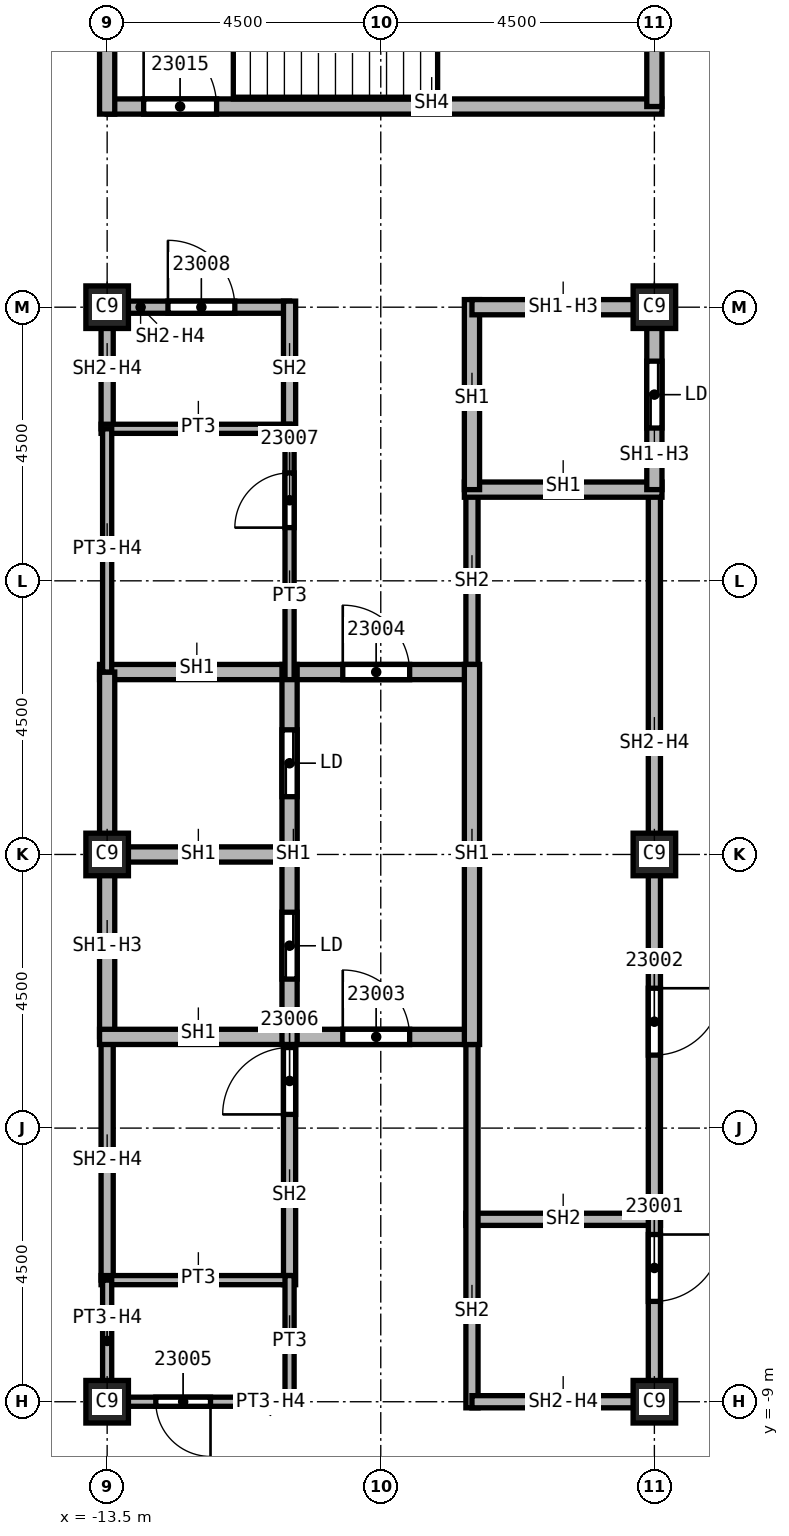
"""IFC4 building model, lengths in metres.
Left out: names, types, materials, properties, quantities, classifications, styles, units other than length and angle.
Written with IfcOpenShell. Run it as: python <this file> out.ifc"""

import sys

from ifc_helpers import new_model, si_unit, direction, frame, frame_2d, origin, origin_2d, place, context, subcontext, project, spatial, rectangle, extrude, element, fill, save


model = new_model("IFC4")
c1 = context("Model", 3, precision=1e-05, world=origin(), true_north=direction((0.0, 1.0)))
c2 = subcontext(c1, "Body", "Model", "MODEL_VIEW")
j1 = project(units=[si_unit("LENGTHUNIT", "METRE"), si_unit("PLANEANGLEUNIT", "RADIAN")], contexts=[c1])
p1 = place(None, origin())
s1 = spatial("IfcSite", under=j1, at=p1, CompositionType="ELEMENT")
p2 = place(p1, origin())
s2 = spatial("IfcBuilding", under=s1, at=p2, CompositionType="ELEMENT")
p3 = place(p2, frame((0.0, 0.0, 326.0)))
s3 = spatial("IfcBuildingStorey", under=s2, at=p3, CompositionType="ELEMENT", Elevation=326.0)
for number, where, z_axis, x_axis in (
    (1, (-4.5, 0.0, 0.0), (0.0, 0.0, 1.0), (1.0, 0.0, 0.0)),
    (2, (-4.5, 9.0, 0.0), (0.0, 0.0, 1.0), (1.0, 0.0, 0.0)),
    (3, (-4.5, -9.0, 0.0), (0.0, 0.0, 1.0), (1.0, 0.0, 0.0)),
    (4, (-13.5, 0.0, 0.0), (0.0, 0.0, 1.0), (1.0, 0.0, 0.0)),
    (5, (-13.5, 9.0, 0.0), (0.0, 0.0, 1.0), (1.0, 0.0, 0.0)),
    (6, (-13.5, -9.0, 0.0), (0.0, 0.0, 1.0), (1.0, 0.0, 0.0)),
):
    element("IfcColumn", number, at=place(p3, frame(where, z_axis=z_axis, x_axis=x_axis)), inside=s3, PredefinedType="COLUMN", context=c2, shape_type="SweptSolid", body=[
        extrude(rectangle(XDim=0.7, YDim=0.7, at=origin_2d()), origin(), (0.0, 0.0, 1.0), 3.74),
    ])
p4 = place(p3, frame((-13.5, -7.0, 0.0), z_axis=(0.0, 0.0, 1.0), x_axis=(0.0, 1.0, 0.0)))
e7 = element("IfcWall", 7, at=p4, inside=s3, PredefinedType="SOLIDWALL", context=c2, shape_type="SweptSolid", body=[
    extrude(rectangle(XDim=4.0, YDim=0.2, at=frame_2d((2.0, 0.0))), origin(), (0.0, 0.0, 1.0), 3.062),
])
p5 = place(p3, frame((-13.5, 7.0, 0.0), z_axis=(0.0, 0.0, 1.0), x_axis=(0.0, 1.0, 0.0)))
e8 = element("IfcWall", 8, at=p5, inside=s3, PredefinedType="SOLIDWALL", context=c2, shape_type="SweptSolid", body=[
    extrude(rectangle(XDim=2.1, YDim=0.2, at=frame_2d((1.05, 0.0))), origin(), (0.0, 0.0, 1.0), 3.062),
])
p6 = place(p3, frame((-13.5, 9.0, 0.0), z_axis=(0.0, 0.0, 1.0), x_axis=(1.0, 0.0, 0.0)))
e9 = element("IfcWall", 9, at=p6, inside=s3, PredefinedType="SOLIDWALL", context=c2, shape_type="SweptSolid", body=[
    extrude(rectangle(XDim=3.0, YDim=0.2, at=frame_2d((1.5, 0.0))), origin(), (0.0, 0.0, 1.0), 3.062),
])
p7 = place(p6, frame((1.0, 0.0, 0.0)))
e10 = element("IfcOpeningElement", 10, at=p7, cuts=e9, PredefinedType="OPENING", context=c2, shape_type="SweptSolid", body=[
    extrude(rectangle(XDim=1.1, YDim=2.1, at=frame_2d((0.55, 1.05))), frame((0.0, 0.1, 0.0), z_axis=(0.0, -1.0, 0.0), x_axis=(1.0, 0.0, 0.0)), (0.0, 0.0, 1.0), 0.2),
])
p8 = place(p3, frame((-10.5, -7.075, 0.0), z_axis=(0.0, 0.0, 1.0), x_axis=(0.0, 1.0, 0.0)))
e11 = element("IfcWall", 11, at=p8, inside=s3, PredefinedType="SOLIDWALL", context=c2, shape_type="SweptSolid", body=[
    extrude(rectangle(XDim=4.2, YDim=0.2, at=frame_2d((2.1, 0.0))), origin(), (0.0, 0.0, 1.0), 3.74),
])
p9 = place(p8, frame((2.8, 0.0, 0.0)))
e12 = element("IfcOpeningElement", 12, at=p9, cuts=e11, PredefinedType="OPENING", context=c2, shape_type="SweptSolid", body=[
    extrude(rectangle(XDim=1.1, YDim=2.1, at=frame_2d((0.55, 1.05))), frame((0.0, 0.1, 0.0), z_axis=(0.0, -1.0, 0.0), x_axis=(1.0, 0.0, 0.0)), (0.0, 0.0, 1.0), 0.2),
])
p10 = place(p3, frame((-10.5, 6.925, 0.0), z_axis=(0.0, 0.0, 1.0), x_axis=(0.0, 1.0, 0.0)))
e13 = element("IfcWall", 13, at=p10, inside=s3, PredefinedType="SOLIDWALL", context=c2, shape_type="SweptSolid", body=[
    extrude(rectangle(XDim=2.175, YDim=0.2, at=frame_2d((1.087, 0.0))), origin(), (0.0, 0.0, 1.0), 3.74),
])
p11 = place(p3, frame((-7.6, -6.0, 0.0), z_axis=(0.0, 0.0, 1.0), x_axis=(1.0, 0.0, 0.0)))
e14 = element("IfcWall", 14, at=p11, inside=s3, PredefinedType="SOLIDWALL", context=c2, shape_type="SweptSolid", body=[
    extrude(rectangle(XDim=3.2, YDim=0.2, at=frame_2d((1.6, 0.0))), origin(), (0.0, 0.0, 1.0), 3.74),
])
p12 = place(p3, frame((-7.5, -9.1, 0.0), z_axis=(0.0, 0.0, 1.0), x_axis=(0.0, 1.0, 0.0)))
e15 = element("IfcWall", 15, at=p12, inside=s3, PredefinedType="SOLIDWALL", context=c2, shape_type="SweptSolid", body=[
    extrude(rectangle(XDim=6.225, YDim=0.2, at=frame_2d((3.113, 0.0))), origin(), (0.0, 0.0, 1.0), 3.74),
])
p13 = place(p3, frame((-7.5, 2.875, 0.0), z_axis=(0.0, 0.0, 1.0), x_axis=(0.0, 1.0, 0.0)))
e16 = element("IfcWall", 16, at=p13, inside=s3, PredefinedType="SOLIDWALL", context=c2, shape_type="SweptSolid", body=[
    extrude(rectangle(XDim=3.125, YDim=0.2, at=frame_2d((1.562, 0.0))), origin(), (0.0, 0.0, 1.0), 3.74),
])
p14 = place(p3, frame((-4.5, -9.0, 0.0), z_axis=(0.0, 0.0, 1.0), x_axis=(-1.0, 0.0, 0.0)))
e17 = element("IfcWall", 17, at=p14, inside=s3, PredefinedType="SOLIDWALL", context=c2, shape_type="SweptSolid", body=[
    extrude(rectangle(XDim=3.0, YDim=0.2, at=frame_2d((1.5, 0.0))), origin(), (0.0, 0.0, 1.0), 3.062),
])
p15 = place(p3, frame((-4.5, 6.0, 0.0), z_axis=(0.0, 0.0, 1.0), x_axis=(0.0, -1.0, 0.0)))
e18 = element("IfcWall", 18, at=p15, inside=s3, PredefinedType="SOLIDWALL", context=c2, shape_type="SweptSolid", body=[
    extrude(rectangle(XDim=15.1, YDim=0.2, at=frame_2d((7.55, 0.0))), origin(), (0.0, 0.0, 1.0), 3.062),
])
p16 = place(p15, frame((12.25, 0.0, 0.0)))
e19 = element("IfcOpeningElement", 19, at=p16, cuts=e18, PredefinedType="OPENING", context=c2, shape_type="SweptSolid", body=[
    extrude(rectangle(XDim=1.1, YDim=2.1, at=frame_2d((0.55, 1.05))), frame((0.0, 0.1, 0.0), z_axis=(0.0, -1.0, 0.0), x_axis=(1.0, 0.0, 0.0)), (0.0, 0.0, 1.0), 0.2),
])
p17 = place(p15, frame((8.2, 0.0, 0.0)))
e20 = element("IfcOpeningElement", 20, at=p17, cuts=e18, PredefinedType="OPENING", context=c2, shape_type="SweptSolid", body=[
    extrude(rectangle(XDim=1.1, YDim=2.1, at=frame_2d((0.55, 1.05))), frame((0.0, 0.1, 0.0), z_axis=(0.0, -1.0, 0.0), x_axis=(1.0, 0.0, 0.0)), (0.0, 0.0, 1.0), 0.2),
])
p18 = place(p3, frame((-13.625, 0.0, 0.0), z_axis=(0.0, 0.0, 1.0), x_axis=(1.0, 0.0, 0.0)))
e21 = element("IfcWall", 21, at=p18, inside=s3, PredefinedType="SOLIDWALL", context=c2, shape_type="SweptSolid", body=[
    extrude(rectangle(XDim=3.125, YDim=0.25, at=frame_2d((1.562, 0.0))), origin(), (0.0, 0.0, 1.0), 3.74),
])
p19 = place(p3, frame((-13.625, 3.0, 0.0), z_axis=(0.0, 0.0, 1.0), x_axis=(1.0, 0.0, 0.0)))
e22 = element("IfcWall", 22, at=p19, inside=s3, PredefinedType="SOLIDWALL", context=c2, shape_type="SweptSolid", body=[
    extrude(rectangle(XDim=6.125, YDim=0.25, at=frame_2d((3.062, 0.0))), origin(), (0.0, 0.0, 1.0), 3.74),
])
p20 = place(p19, frame((4.0, 0.0, 0.0)))
e23 = element("IfcOpeningElement", 23, at=p20, cuts=e22, PredefinedType="OPENING", context=c2, shape_type="SweptSolid", body=[
    extrude(rectangle(XDim=1.1, YDim=2.1, at=frame_2d((0.55, 1.05))), frame((0.0, 0.125, 0.0), z_axis=(0.0, -1.0, 0.0), x_axis=(1.0, 0.0, 0.0)), (0.0, 0.0, 1.0), 0.25),
])
p21 = place(p3, frame((-13.5, -3.0, 0.0), z_axis=(0.0, 0.0, 1.0), x_axis=(0.0, 1.0, 0.0)))
e24 = element("IfcWall", 24, at=p21, inside=s3, PredefinedType="SOLIDWALL", context=c2, shape_type="SweptSolid", body=[
    extrude(rectangle(XDim=6.0, YDim=0.25, at=frame_2d((3.0, 0.0))), origin(), (0.0, 0.0, 1.0), 3.062),
])
p22 = place(p3, frame((-13.625, -3.0, 0.0), z_axis=(0.0, 0.0, 1.0), x_axis=(1.0, 0.0, 0.0)))
e25 = element("IfcWall", 25, at=p22, inside=s3, PredefinedType="SOLIDWALL", context=c2, shape_type="SweptSolid", body=[
    extrude(rectangle(XDim=6.125, YDim=0.25, at=frame_2d((3.062, 0.0))), origin(), (0.0, 0.0, 1.0), 3.74),
])
p23 = place(p22, frame((4.0, 0.0, 0.0)))
e26 = element("IfcOpeningElement", 26, at=p23, cuts=e25, PredefinedType="OPENING", context=c2, shape_type="SweptSolid", body=[
    extrude(rectangle(XDim=1.1, YDim=2.1, at=frame_2d((0.55, 1.05))), frame((0.0, 0.125, 0.0), z_axis=(0.0, -1.0, 0.0), x_axis=(1.0, 0.0, 0.0)), (0.0, 0.0, 1.0), 0.25),
])
p24 = place(p3, frame((-10.5, -3.125, 0.0), z_axis=(0.0, 0.0, 1.0), x_axis=(0.0, 1.0, 0.0)))
e27 = element("IfcWall", 27, at=p24, inside=s3, PredefinedType="SOLIDWALL", context=c2, shape_type="SweptSolid", body=[
    extrude(rectangle(XDim=6.25, YDim=0.25, at=frame_2d((3.125, 0.0))), origin(), (0.0, 0.0, 1.0), 3.74),
])
p25 = place(p24, frame((1.075, 0.0, 0.0)))
e28 = element("IfcOpeningElement", 28, at=p25, cuts=e27, PredefinedType="OPENING", context=c2, shape_type="SweptSolid", body=[
    extrude(rectangle(XDim=1.1, YDim=2.1, at=frame_2d((0.55, 1.05))), frame((0.0, 0.125, 0.0), z_axis=(0.0, -1.0, 0.0), x_axis=(1.0, 0.0, 0.0)), (0.0, 0.0, 1.0), 0.25),
])
p26 = place(p24, frame((4.075, 0.0, 0.0)))
e29 = element("IfcOpeningElement", 29, at=p26, cuts=e27, PredefinedType="OPENING", context=c2, shape_type="SweptSolid", body=[
    extrude(rectangle(XDim=1.1, YDim=2.1, at=frame_2d((0.55, 1.05))), frame((0.0, 0.125, 0.0), z_axis=(0.0, -1.0, 0.0), x_axis=(1.0, 0.0, 0.0)), (0.0, 0.0, 1.0), 0.25),
])
p27 = place(p3, frame((-7.625, 6.0, 0.0), z_axis=(0.0, 0.0, 1.0), x_axis=(1.0, 0.0, 0.0)))
e30 = element("IfcWall", 30, at=p27, inside=s3, PredefinedType="SOLIDWALL", context=c2, shape_type="SweptSolid", body=[
    extrude(rectangle(XDim=3.25, YDim=0.25, at=frame_2d((1.625, 0.0))), origin(), (0.0, 0.0, 1.0), 3.74),
])
p28 = place(p3, frame((-7.5, -3.125, 0.0), z_axis=(0.0, 0.0, 1.0), x_axis=(0.0, 1.0, 0.0)))
e31 = element("IfcWall", 31, at=p28, inside=s3, PredefinedType="SOLIDWALL", context=c2, shape_type="SweptSolid", body=[
    extrude(rectangle(XDim=6.25, YDim=0.25, at=frame_2d((3.125, 0.0))), origin(), (0.0, 0.0, 1.0), 3.74),
])
p29 = place(p3, frame((-7.5, 6.0, 0.0), z_axis=(0.0, 0.0, 1.0), x_axis=(0.0, 1.0, 0.0)))
e32 = element("IfcWall", 32, at=p29, inside=s3, PredefinedType="SOLIDWALL", context=c2, shape_type="SweptSolid", body=[
    extrude(rectangle(XDim=3.125, YDim=0.25, at=frame_2d((1.562, 0.0))), origin(), (0.0, 0.0, 1.0), 3.74),
])
p30 = place(p3, frame((-7.5, 9.0, 0.0), z_axis=(0.0, 0.0, 1.0), x_axis=(1.0, 0.0, 0.0)))
e33 = element("IfcWall", 33, at=p30, inside=s3, PredefinedType="SOLIDWALL", context=c2, shape_type="SweptSolid", body=[
    extrude(rectangle(XDim=3.0, YDim=0.25, at=frame_2d((1.5, 0.0))), origin(), (0.0, 0.0, 1.0), 3.062),
])
p31 = place(p3, frame((-4.5, 9.125, 0.0), z_axis=(0.0, 0.0, 1.0), x_axis=(0.0, -1.0, 0.0)))
e34 = element("IfcWall", 34, at=p31, inside=s3, PredefinedType="SOLIDWALL", context=c2, shape_type="SweptSolid", body=[
    extrude(rectangle(XDim=3.125, YDim=0.25, at=frame_2d((1.562, 0.0))), origin(), (0.0, 0.0, 1.0), 3.062),
])
p32 = place(p31, frame((1.012, 0.0, 0.0)))
e35 = element("IfcOpeningElement", 35, at=p32, cuts=e34, PredefinedType="OPENING", context=c2, shape_type="SweptSolid", body=[
    extrude(rectangle(XDim=1.1, YDim=2.1, at=frame_2d((0.55, 1.05))), frame((0.0, 0.125, 0.0), z_axis=(0.0, -1.0, 0.0), x_axis=(1.0, 0.0, 0.0)), (0.0, 0.0, 1.0), 0.25),
])
p33 = place(p3, frame((-13.5, 12.3, 0.0), z_axis=(0.0, 0.0, 1.0), x_axis=(1.0, 0.0, 0.0)))
e36 = element("IfcWall", 36, at=p33, inside=s3, PredefinedType="SOLIDWALL", context=c2, shape_type="SweptSolid", body=[
    extrude(rectangle(XDim=9.125, YDim=0.25, at=frame_2d((4.562, 0.0))), origin(), (0.0, 0.0, 1.0), 3.74),
])
p34 = place(p33, frame((0.6, 0.0, 0.0)))
e37 = element("IfcOpeningElement", 37, at=p34, cuts=e36, PredefinedType="OPENING", context=c2, shape_type="SweptSolid", body=[
    extrude(rectangle(XDim=1.2, YDim=2.1, at=frame_2d((0.6, 1.05))), frame((0.0, 0.125, 0.0), z_axis=(0.0, -1.0, 0.0), x_axis=(1.0, 0.0, 0.0)), (0.0, 0.0, 1.0), 0.25),
])
p35 = place(p3, frame((-13.5, 12.175, 0.0), z_axis=(0.0, 0.0, 1.0), x_axis=(0.0, 1.0, 0.0)))
e38 = element("IfcWall", 38, at=p35, inside=s3, PredefinedType="SOLIDWALL", context=c2, shape_type="SweptSolid", body=[
    extrude(rectangle(XDim=4.75, YDim=0.25, at=frame_2d((2.375, 0.0))), origin(), (0.0, 0.0, 1.0), 3.74),
])
p36 = place(p3, frame((-4.5, 16.8, 0.0), z_axis=(0.0, 0.0, 1.0), x_axis=(0.0, -1.0, 0.0)))
e39 = element("IfcWall", 39, at=p36, inside=s3, PredefinedType="SOLIDWALL", context=c2, shape_type="SweptSolid", body=[
    extrude(rectangle(XDim=4.5, YDim=0.25, at=frame_2d((2.25, 0.0))), origin(), (0.0, 0.0, 1.0), 3.74),
])
for number, where, z_axis, x_axis in (
    (40, (-13.6, -7.0, 0.0), (0.0, 0.0, 1.0), (1.0, 0.0, 0.0)),
    (41, (-13.6, 7.0, 0.0), (0.0, 0.0, 1.0), (1.0, 0.0, 0.0)),
):
    element("IfcWall", number, at=place(p3, frame(where, z_axis=z_axis, x_axis=x_axis)), inside=s3, PredefinedType="PARTITIONING", context=c2, shape_type="SweptSolid", body=[
        extrude(rectangle(XDim=3.1, YDim=0.15, at=frame_2d((1.55, 0.0))), origin(), (0.0, 0.0, 1.0), 3.74),
    ])
p37 = place(p3, frame((-13.5, -9.075, 0.0), z_axis=(0.0, 0.0, 1.0), x_axis=(0.0, 1.0, 0.0)))
e42 = element("IfcWall", 42, at=p37, inside=s3, PredefinedType="PARTITIONING", context=c2, shape_type="SweptSolid", body=[
    extrude(rectangle(XDim=2.075, YDim=0.15, at=frame_2d((1.038, 0.0))), origin(), (0.0, 0.0, 1.0), 3.062),
])
p38 = place(p3, frame((-13.5, 3.0, 0.0), z_axis=(0.0, 0.0, 1.0), x_axis=(0.0, 1.0, 0.0)))
e43 = element("IfcWall", 43, at=p38, inside=s3, PredefinedType="PARTITIONING", context=c2, shape_type="SweptSolid", body=[
    extrude(rectangle(XDim=4.0, YDim=0.15, at=frame_2d((2.0, 0.0))), origin(), (0.0, 0.0, 1.0), 3.062),
])
p39 = place(p3, frame((-10.5, -9.075, 0.0), z_axis=(0.0, 0.0, 1.0), x_axis=(0.0, 1.0, 0.0)))
e44 = element("IfcWall", 44, at=p39, inside=s3, PredefinedType="PARTITIONING", context=c2, shape_type="SweptSolid", body=[
    extrude(rectangle(XDim=2.15, YDim=0.15, at=frame_2d((1.075, 0.0))), origin(), (0.0, 0.0, 1.0), 3.74),
])
p40 = place(p3, frame((-10.5, -9.0, 0.0), z_axis=(0.0, 0.0, 1.0), x_axis=(-1.0, 0.0, 0.0)))
e45 = element("IfcWall", 45, at=p40, inside=s3, PredefinedType="PARTITIONING", context=c2, shape_type="SweptSolid", body=[
    extrude(rectangle(XDim=3.0, YDim=0.15, at=frame_2d((1.5, 0.0))), origin(), (0.0, 0.0, 1.0), 3.062),
])
p41 = place(p40, frame((1.3, 0.0, 0.0)))
e46 = element("IfcOpeningElement", 46, at=p41, cuts=e45, PredefinedType="OPENING", context=c2, shape_type="SweptSolid", body=[
    extrude(rectangle(XDim=0.9, YDim=2.1, at=frame_2d((0.45, 1.05))), frame((0.0, 0.075, 0.0), z_axis=(0.0, -1.0, 0.0), x_axis=(1.0, 0.0, 0.0)), (0.0, 0.0, 1.0), 0.15),
])
p42 = place(p3, frame((-10.5, 2.875, 0.0), z_axis=(0.0, 0.0, 1.0), x_axis=(0.0, 1.0, 0.0)))
e47 = element("IfcWall", 47, at=p42, inside=s3, PredefinedType="PARTITIONING", context=c2, shape_type="SweptSolid", body=[
    extrude(rectangle(XDim=4.2, YDim=0.15, at=frame_2d((2.1, 0.0))), origin(), (0.0, 0.0, 1.0), 3.74),
])
p43 = place(p42, frame((2.5, 0.0, 0.0)))
e48 = element("IfcOpeningElement", 48, at=p43, cuts=e47, PredefinedType="OPENING", context=c2, shape_type="SweptSolid", body=[
    extrude(rectangle(XDim=0.9, YDim=2.1, at=frame_2d((0.45, 1.05))), frame((0.0, 0.075, 0.0), z_axis=(0.0, -1.0, 0.0), x_axis=(1.0, 0.0, 0.0)), (0.0, 0.0, 1.0), 0.15),
])
p44 = place(p16, origin())
e49 = element("IfcDoor", 49, at=p44, inside=s3, OperationType="SINGLE_SWING_RIGHT", PredefinedType="DOOR", context=c2, shape_type="SweptSolid", body=[
    extrude(rectangle(XDim=1.1, YDim=2.1, at=frame_2d((0.55, 1.05))), frame((0.0, 0.025, 0.0), z_axis=(0.0, -1.0, 0.0), x_axis=(1.0, 0.0, 0.0)), (0.0, 0.0, 1.0), 0.05),
])
fill(e19, e49)
p45 = place(p17, origin())
e50 = element("IfcDoor", 50, at=p45, inside=s3, OperationType="SINGLE_SWING_LEFT", PredefinedType="DOOR", context=c2, shape_type="SweptSolid", body=[
    extrude(rectangle(XDim=1.1, YDim=2.1, at=frame_2d((0.55, 1.05))), frame((0.0, 0.025, 0.0), z_axis=(0.0, -1.0, 0.0), x_axis=(1.0, 0.0, 0.0)), (0.0, 0.0, 1.0), 0.05),
])
fill(e20, e50)
p46 = place(p23, origin())
e51 = element("IfcDoor", 51, at=p46, inside=s3, OperationType="SINGLE_SWING_RIGHT", PredefinedType="DOOR", context=c2, shape_type="SweptSolid", body=[
    extrude(rectangle(XDim=1.1, YDim=2.1, at=frame_2d((0.55, 1.05))), frame((0.0, 0.025, 0.0), z_axis=(0.0, -1.0, 0.0), x_axis=(1.0, 0.0, 0.0)), (0.0, 0.0, 1.0), 0.05),
])
fill(e26, e51)
p47 = place(p20, origin())
e52 = element("IfcDoor", 52, at=p47, inside=s3, OperationType="SINGLE_SWING_LEFT", PredefinedType="DOOR", context=c2, shape_type="SweptSolid", body=[
    extrude(rectangle(XDim=1.1, YDim=2.1, at=frame_2d((0.55, 1.05))), frame((0.0, 0.025, 0.0), z_axis=(0.0, -1.0, 0.0), x_axis=(1.0, 0.0, 0.0)), (0.0, 0.0, 1.0), 0.05),
])
fill(e23, e52)
p48 = place(p41, origin())
e53 = element("IfcDoor", 53, at=p48, inside=s3, OperationType="SINGLE_SWING_RIGHT", PredefinedType="DOOR", context=c2, shape_type="SweptSolid", body=[
    extrude(rectangle(XDim=0.9, YDim=2.1, at=frame_2d((0.45, 1.05))), frame((0.0, 0.025, 0.0), z_axis=(0.0, -1.0, 0.0), x_axis=(1.0, 0.0, 0.0)), (0.0, 0.0, 1.0), 0.05),
])
fill(e46, e53)
p49 = place(p9, origin())
e54 = element("IfcDoor", 54, at=p49, inside=s3, OperationType="SINGLE_SWING_LEFT", PredefinedType="DOOR", context=c2, shape_type="SweptSolid", body=[
    extrude(rectangle(XDim=1.1, YDim=2.1, at=frame_2d((0.55, 1.05))), frame((0.0, 0.025, 0.0), z_axis=(0.0, -1.0, 0.0), x_axis=(1.0, 0.0, 0.0)), (0.0, 0.0, 1.0), 0.05),
])
fill(e12, e54)
p50 = place(p43, origin())
e55 = element("IfcDoor", 55, at=p50, inside=s3, OperationType="SINGLE_SWING_RIGHT", PredefinedType="DOOR", context=c2, shape_type="SweptSolid", body=[
    extrude(rectangle(XDim=0.9, YDim=2.1, at=frame_2d((0.45, 1.05))), frame((0.0, 0.025, 0.0), z_axis=(0.0, -1.0, 0.0), x_axis=(1.0, 0.0, 0.0)), (0.0, 0.0, 1.0), 0.05),
])
fill(e48, e55)
p51 = place(p7, origin())
e56 = element("IfcDoor", 56, at=p51, inside=s3, OperationType="SINGLE_SWING_LEFT", PredefinedType="DOOR", context=c2, shape_type="SweptSolid", body=[
    extrude(rectangle(XDim=1.1, YDim=2.1, at=frame_2d((0.55, 1.05))), frame((0.0, 0.025, 0.0), z_axis=(0.0, -1.0, 0.0), x_axis=(1.0, 0.0, 0.0)), (0.0, 0.0, 1.0), 0.05),
])
fill(e10, e56)
p52 = place(p34, origin())
e57 = element("IfcDoor", 57, at=p52, inside=s3, OperationType="SINGLE_SWING_RIGHT", PredefinedType="DOOR", context=c2, shape_type="SweptSolid", body=[
    extrude(rectangle(XDim=1.2, YDim=2.1, at=frame_2d((0.6, 1.05))), frame((0.0, 0.025, 0.0), z_axis=(0.0, -1.0, 0.0), x_axis=(1.0, 0.0, 0.0)), (0.0, 0.0, 1.0), 0.05),
])
fill(e37, e57)
p53 = place(p32, origin())
e58 = element("IfcDoor", 58, at=p53, inside=s3, OperationType="SLIDING_TO_LEFT", PredefinedType="DOOR", context=c2, shape_type="SweptSolid", body=[
    extrude(rectangle(XDim=1.1, YDim=2.1, at=frame_2d((0.55, 1.05))), frame((0.0, 0.025, 0.0), z_axis=(0.0, -1.0, 0.0), x_axis=(1.0, 0.0, 0.0)), (0.0, 0.0, 1.0), 0.05),
])
fill(e35, e58)
p54 = place(p25, origin())
e59 = element("IfcDoor", 59, at=p54, inside=s3, OperationType="SLIDING_TO_LEFT", PredefinedType="DOOR", context=c2, shape_type="SweptSolid", body=[
    extrude(rectangle(XDim=1.1, YDim=2.1, at=frame_2d((0.55, 1.05))), frame((0.0, 0.025, 0.0), z_axis=(0.0, -1.0, 0.0), x_axis=(1.0, 0.0, 0.0)), (0.0, 0.0, 1.0), 0.05),
])
fill(e28, e59)
p55 = place(p26, origin())
e60 = element("IfcDoor", 60, at=p55, inside=s3, OperationType="SLIDING_TO_LEFT", PredefinedType="DOOR", context=c2, shape_type="SweptSolid", body=[
    extrude(rectangle(XDim=1.1, YDim=2.1, at=frame_2d((0.55, 1.05))), frame((0.0, 0.025, 0.0), z_axis=(0.0, -1.0, 0.0), x_axis=(1.0, 0.0, 0.0)), (0.0, 0.0, 1.0), 0.05),
])
fill(e29, e60)
save(model, sys.argv[1])
